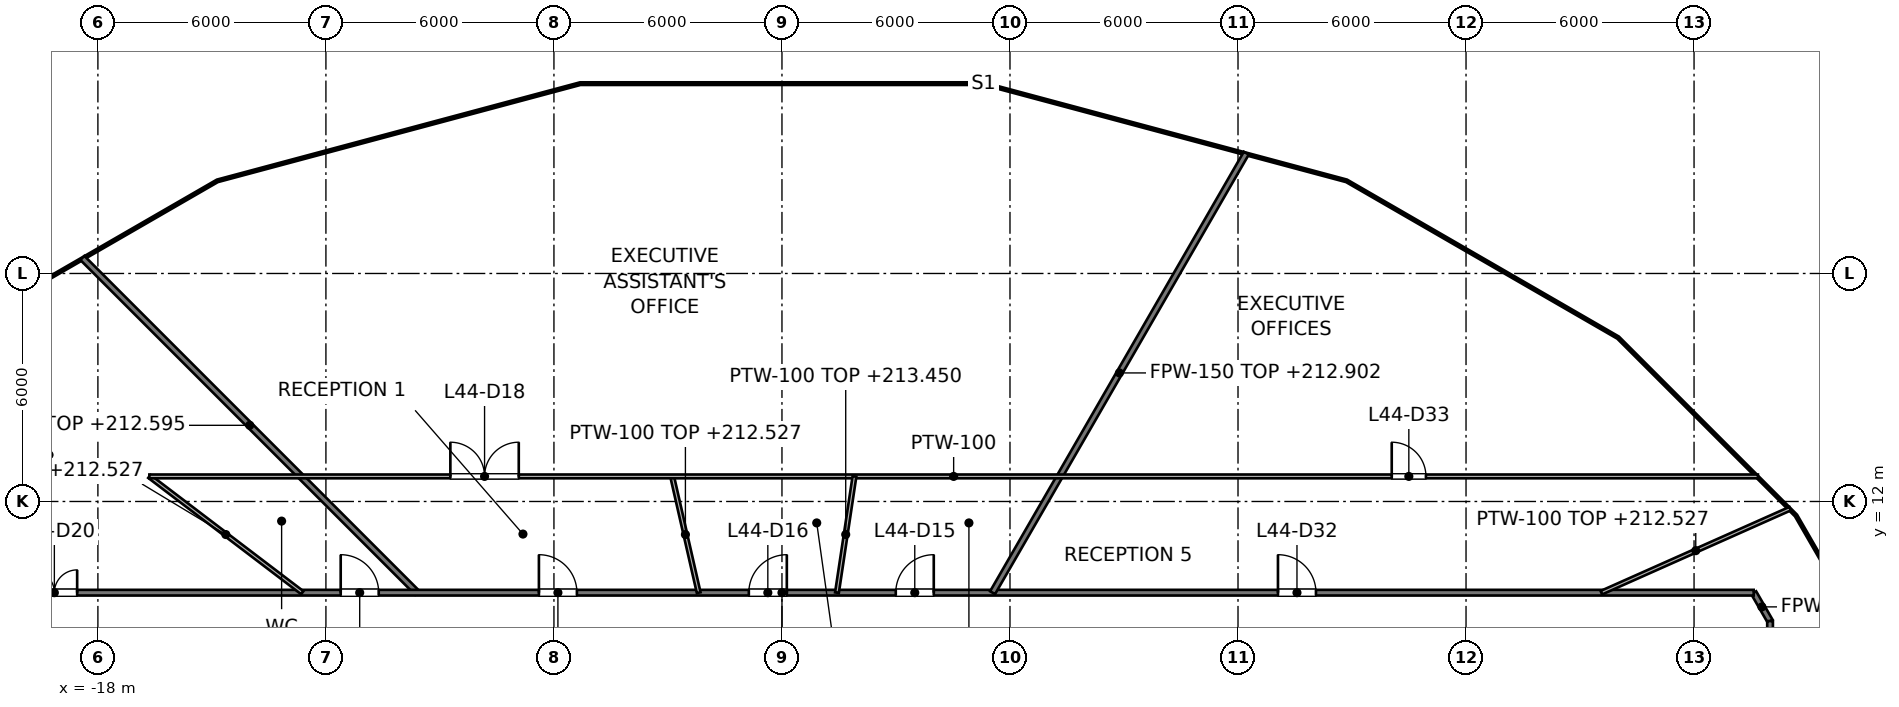
"""IFC4 building model, lengths in metres.
Left out: names, types, materials, properties, quantities, classifications, styles, units other than length and angle.
Written with IfcOpenShell. Run it as: python <this file> out.ifc"""

import sys

from ifc_helpers import new_model, si_unit, direction, frame, frame_2d, origin, place, context, subcontext, project, spatial, rectangle, extrude, element, fill, save


model = new_model("IFC4")
c1 = context("Model", 3, precision=1e-05, world=origin(), true_north=direction((0.0, 1.0)))
c2 = subcontext(c1, "Body", "Model", "MODEL_VIEW")
j1 = project(units=[si_unit("LENGTHUNIT", "METRE"), si_unit("PLANEANGLEUNIT", "RADIAN")], contexts=[c1])
p1 = place(None, origin())
s1 = spatial("IfcSite", under=j1, at=p1, CompositionType="ELEMENT")
p2 = place(p1, origin())
s2 = spatial("IfcBuilding", under=s1, at=p2, CompositionType="ELEMENT")
p3 = place(p2, frame((0.0, 0.0, 209.6)))
s3 = spatial("IfcBuildingStorey", under=s2, at=p3, CompositionType="ELEMENT", Elevation=209.6)
p4 = place(p3, frame((25.569, 9.6, 0.0), z_axis=(0.0, 0.0, 1.0), x_axis=(0.499640762619, -0.866232710263, 0.0)))
e1 = element("IfcWall", 1, at=p4, inside=s3, PredefinedType="PARTITIONING", context=c2, shape_type="SweptSolid", body=[
    extrude(rectangle(XDim=0.863, YDim=0.15, at=frame_2d((0.431, 0.0))), origin(), (0.0, 0.0, 1.0), 3.85),
])
p5 = place(p3, frame((-18.409, 18.409, 0.0), z_axis=(0.0, 0.0, 1.0), x_axis=(0.707106781187, -0.707106781187, 0.0)))
e2 = element("IfcWall", 2, at=p5, inside=s3, PredefinedType="PARTITIONING", context=c2, shape_type="SweptSolid", body=[
    extrude(rectangle(XDim=12.458, YDim=0.15, at=frame_2d((6.229, 0.0))), origin(), (0.0, 0.0, 1.0), 2.995),
])
p6 = place(p3, frame((-25.569, 9.6, 0.0), z_axis=(0.0, 0.0, 1.0), x_axis=(1.0, 0.0, 0.0)))
e3 = element("IfcWall", 3, at=p6, inside=s3, PredefinedType="PARTITIONING", context=c2, shape_type="SweptSolid", body=[
    extrude(rectangle(XDim=51.138, YDim=0.15, at=frame_2d((25.569, 0.0))), origin(), (0.0, 0.0, 1.0), 2.918),
])
p7 = place(p6, frame((28.563, 0.0, 0.0)))
e4 = element("IfcOpeningElement", 4, at=p7, cuts=e3, PredefinedType="OPENING", context=c2, shape_type="SweptSolid", body=[
    extrude(rectangle(XDim=1.0, YDim=2.1, at=frame_2d((0.5, 1.05))), frame((0.0, 0.075, 0.0), z_axis=(0.0, -1.0, 0.0), x_axis=(1.0, 0.0, 0.0)), (0.0, 0.0, 1.0), 0.15),
])
p8 = place(p6, frame((24.697, 0.0, 0.0)))
e5 = element("IfcOpeningElement", 5, at=p8, cuts=e3, PredefinedType="OPENING", context=c2, shape_type="SweptSolid", body=[
    extrude(rectangle(XDim=1.0, YDim=2.1, at=frame_2d((0.5, 1.05))), frame((0.0, 0.075, 0.0), z_axis=(0.0, -1.0, 0.0), x_axis=(1.0, 0.0, 0.0)), (0.0, 0.0, 1.0), 0.15),
])
p9 = place(p6, frame((19.174, 0.0, 0.0)))
e6 = element("IfcOpeningElement", 6, at=p9, cuts=e3, PredefinedType="OPENING", context=c2, shape_type="SweptSolid", body=[
    extrude(rectangle(XDim=1.0, YDim=2.1, at=frame_2d((0.5, 1.05))), frame((0.0, 0.075, 0.0), z_axis=(0.0, -1.0, 0.0), x_axis=(1.0, 0.0, 0.0)), (0.0, 0.0, 1.0), 0.15),
])
p10 = place(p6, frame((13.958, 0.0, 0.0)))
e7 = element("IfcOpeningElement", 7, at=p10, cuts=e3, PredefinedType="OPENING", context=c2, shape_type="SweptSolid", body=[
    extrude(rectangle(XDim=1.0, YDim=2.1, at=frame_2d((0.5, 1.05))), frame((0.0, 0.075, 0.0), z_axis=(0.0, -1.0, 0.0), x_axis=(1.0, 0.0, 0.0)), (0.0, 0.0, 1.0), 0.15),
])
p11 = place(p6, frame((5.823, 0.0, 0.0)))
e8 = element("IfcOpeningElement", 8, at=p11, cuts=e3, PredefinedType="OPENING", context=c2, shape_type="SweptSolid", body=[
    extrude(rectangle(XDim=1.2, YDim=2.1, at=frame_2d((0.6, 1.05))), frame((0.0, 0.075, 0.0), z_axis=(0.0, -1.0, 0.0), x_axis=(1.0, 0.0, 0.0)), (0.0, 0.0, 1.0), 0.15),
])
p12 = place(p6, frame((38.621, 0.0, 0.0)))
e9 = element("IfcOpeningElement", 9, at=p12, cuts=e3, PredefinedType="OPENING", context=c2, shape_type="SweptSolid", body=[
    extrude(rectangle(XDim=1.0, YDim=2.1, at=frame_2d((0.5, 1.05))), frame((0.0, 0.075, 0.0), z_axis=(0.0, -1.0, 0.0), x_axis=(1.0, 0.0, 0.0)), (0.0, 0.0, 1.0), 0.15),
])
p13 = place(p3, frame((5.542, 9.6, 0.0), z_axis=(0.0, 0.0, 1.0), x_axis=(0.499892848626, 0.866087258821, 0.0)))
e10 = element("IfcWall", 10, at=p13, inside=s3, PredefinedType="PARTITIONING", context=c2, shape_type="SweptSolid", body=[
    extrude(rectangle(XDim=13.354, YDim=0.15, at=frame_2d((6.677, 0.0))), origin(), (0.0, 0.0, 1.0), 3.302),
])
p14 = place(p3, frame((26.0, 6.8, 0.0), z_axis=(0.0, 0.0, 1.0), x_axis=(0.0, 1.0, 0.0)))
e11 = element("IfcWall", 11, at=p14, inside=s3, PredefinedType="PARTITIONING", context=c2, shape_type="SweptSolid", body=[
    extrude(rectangle(XDim=2.053, YDim=0.15, at=frame_2d((1.026, 0.0))), origin(), (0.0, 0.0, 1.0), 2.927),
])
p15 = place(p3, frame((-2.89, 12.66, 0.0), z_axis=(0.0, 0.0, 1.0), x_axis=(0.222700185816, -0.974886981777, 0.0)))
e12 = element("IfcWall", 12, at=p15, inside=s3, PredefinedType="PARTITIONING", context=c2, shape_type="SweptSolid", body=[
    extrude(rectangle(XDim=3.139, YDim=0.1, at=frame_2d((1.569, 0.0))), origin(), (0.0, 0.0, 1.0), 2.927),
])
p16 = place(p3, frame((-16.646, 12.66, 0.0), z_axis=(0.0, 0.0, 1.0), x_axis=(0.796006750332, -0.605287744322, 0.0)))
e13 = element("IfcWall", 13, at=p16, inside=s3, PredefinedType="PARTITIONING", context=c2, shape_type="SweptSolid", body=[
    extrude(rectangle(XDim=5.055, YDim=0.1, at=frame_2d((2.528, 0.0))), origin(), (0.0, 0.0, 1.0), 2.927),
])
p17 = place(p3, frame((-16.646, 12.66, 0.0), z_axis=(0.0, 0.0, 1.0), x_axis=(1.0, 0.0, 0.0)))
e14 = element("IfcWall", 14, at=p17, inside=s3, PredefinedType="PARTITIONING", context=c2, shape_type="SweptSolid", body=[
    extrude(rectangle(XDim=42.327, YDim=0.1, at=frame_2d((21.164, 0.0))), origin(), (0.0, 0.0, 1.0), 2.918),
])
p18 = place(p17, frame((7.92, 0.0, 0.0)))
e15 = element("IfcOpeningElement", 15, at=p18, cuts=e14, PredefinedType="OPENING", context=c2, shape_type="SweptSolid", body=[
    extrude(rectangle(XDim=1.8, YDim=2.1, at=frame_2d((0.9, 1.05))), frame((0.0, 0.05, 0.0), z_axis=(0.0, -1.0, 0.0), x_axis=(1.0, 0.0, 0.0)), (0.0, 0.0, 1.0), 0.1),
])
p19 = place(p17, frame((32.691, 0.0, 0.0)))
e16 = element("IfcOpeningElement", 16, at=p19, cuts=e14, PredefinedType="OPENING", context=c2, shape_type="SweptSolid", body=[
    extrude(rectangle(XDim=0.9, YDim=2.1, at=frame_2d((0.45, 1.05))), frame((0.0, 0.05, 0.0), z_axis=(0.0, -1.0, 0.0), x_axis=(1.0, 0.0, 0.0)), (0.0, 0.0, 1.0), 0.1),
])
p20 = place(p3, frame((21.561, 9.6, 0.0), z_axis=(0.0, 0.0, 1.0), x_axis=(0.913544765656, 0.406738197299, 0.0)))
e17 = element("IfcWall", 17, at=p20, inside=s3, PredefinedType="PARTITIONING", context=c2, shape_type="SweptSolid", body=[
    extrude(rectangle(XDim=5.438, YDim=0.1, at=frame_2d((2.719, 0.0))), origin(), (0.0, 0.0, 1.0), 2.927),
])
p21 = place(p3, frame((1.447, 9.6, 0.0), z_axis=(0.0, 0.0, 1.0), x_axis=(0.148961585641, 0.988842983493, 0.0)))
e18 = element("IfcWall", 18, at=p21, inside=s3, PredefinedType="PARTITIONING", context=c2, shape_type="SweptSolid", body=[
    extrude(rectangle(XDim=3.094, YDim=0.1, at=frame_2d((1.547, 0.0))), origin(), (0.0, 0.0, 1.0), 3.85),
])
p22 = place(p7, origin())
e19 = element("IfcDoor", 19, at=p22, inside=s3, OperationType="SINGLE_SWING_RIGHT", PredefinedType="DOOR", context=c2, shape_type="SweptSolid", body=[
    extrude(rectangle(XDim=1.0, YDim=2.1, at=frame_2d((0.5, 1.05))), frame((0.0, 0.025, 0.0), z_axis=(0.0, -1.0, 0.0), x_axis=(1.0, 0.0, 0.0)), (0.0, 0.0, 1.0), 0.05),
])
fill(e4, e19)
p23 = place(p8, origin())
e20 = element("IfcDoor", 20, at=p23, inside=s3, OperationType="SINGLE_SWING_RIGHT", PredefinedType="DOOR", context=c2, shape_type="SweptSolid", body=[
    extrude(rectangle(XDim=1.0, YDim=2.1, at=frame_2d((0.5, 1.05))), frame((0.0, 0.025, 0.0), z_axis=(0.0, -1.0, 0.0), x_axis=(1.0, 0.0, 0.0)), (0.0, 0.0, 1.0), 0.05),
])
fill(e5, e20)
p24 = place(p9, origin())
e21 = element("IfcDoor", 21, at=p24, inside=s3, OperationType="SINGLE_SWING_LEFT", PredefinedType="DOOR", context=c2, shape_type="SweptSolid", body=[
    extrude(rectangle(XDim=1.0, YDim=2.1, at=frame_2d((0.5, 1.05))), frame((0.0, 0.025, 0.0), z_axis=(0.0, -1.0, 0.0), x_axis=(1.0, 0.0, 0.0)), (0.0, 0.0, 1.0), 0.05),
])
fill(e6, e21)
p25 = place(p18, origin())
e22 = element("IfcDoor", 22, at=p25, inside=s3, OperationType="DOUBLE_DOOR_SINGLE_SWING", PredefinedType="DOOR", context=c2, shape_type="SweptSolid", body=[
    extrude(rectangle(XDim=1.8, YDim=2.1, at=frame_2d((0.9, 1.05))), frame((0.0, 0.025, 0.0), z_axis=(0.0, -1.0, 0.0), x_axis=(1.0, 0.0, 0.0)), (0.0, 0.0, 1.0), 0.05),
])
fill(e15, e22)
p26 = place(p10, origin())
e23 = element("IfcDoor", 23, at=p26, inside=s3, OperationType="SINGLE_SWING_LEFT", PredefinedType="DOOR", context=c2, shape_type="SweptSolid", body=[
    extrude(rectangle(XDim=1.0, YDim=2.1, at=frame_2d((0.5, 1.05))), frame((0.0, 0.025, 0.0), z_axis=(0.0, -1.0, 0.0), x_axis=(1.0, 0.0, 0.0)), (0.0, 0.0, 1.0), 0.05),
])
fill(e7, e23)
p27 = place(p11, origin())
e24 = element("IfcDoor", 24, at=p27, inside=s3, OperationType="DOUBLE_DOOR_SINGLE_SWING", PredefinedType="DOOR", context=c2, shape_type="SweptSolid", body=[
    extrude(rectangle(XDim=1.2, YDim=2.1, at=frame_2d((0.6, 1.05))), frame((0.0, 0.025, 0.0), z_axis=(0.0, -1.0, 0.0), x_axis=(1.0, 0.0, 0.0)), (0.0, 0.0, 1.0), 0.05),
])
fill(e8, e24)
p28 = place(p12, origin())
e25 = element("IfcDoor", 25, at=p28, inside=s3, OperationType="SINGLE_SWING_LEFT", PredefinedType="DOOR", context=c2, shape_type="SweptSolid", body=[
    extrude(rectangle(XDim=1.0, YDim=2.1, at=frame_2d((0.5, 1.05))), frame((0.0, 0.025, 0.0), z_axis=(0.0, -1.0, 0.0), x_axis=(1.0, 0.0, 0.0)), (0.0, 0.0, 1.0), 0.05),
])
fill(e9, e25)
p29 = place(p19, origin())
e26 = element("IfcDoor", 26, at=p29, inside=s3, OperationType="SINGLE_SWING_LEFT", PredefinedType="DOOR", context=c2, shape_type="SweptSolid", body=[
    extrude(rectangle(XDim=0.9, YDim=2.1, at=frame_2d((0.45, 1.05))), frame((0.0, 0.025, 0.0), z_axis=(0.0, -1.0, 0.0), x_axis=(1.0, 0.0, 0.0)), (0.0, 0.0, 1.0), 0.05),
])
fill(e16, e26)
save(model, sys.argv[1])
